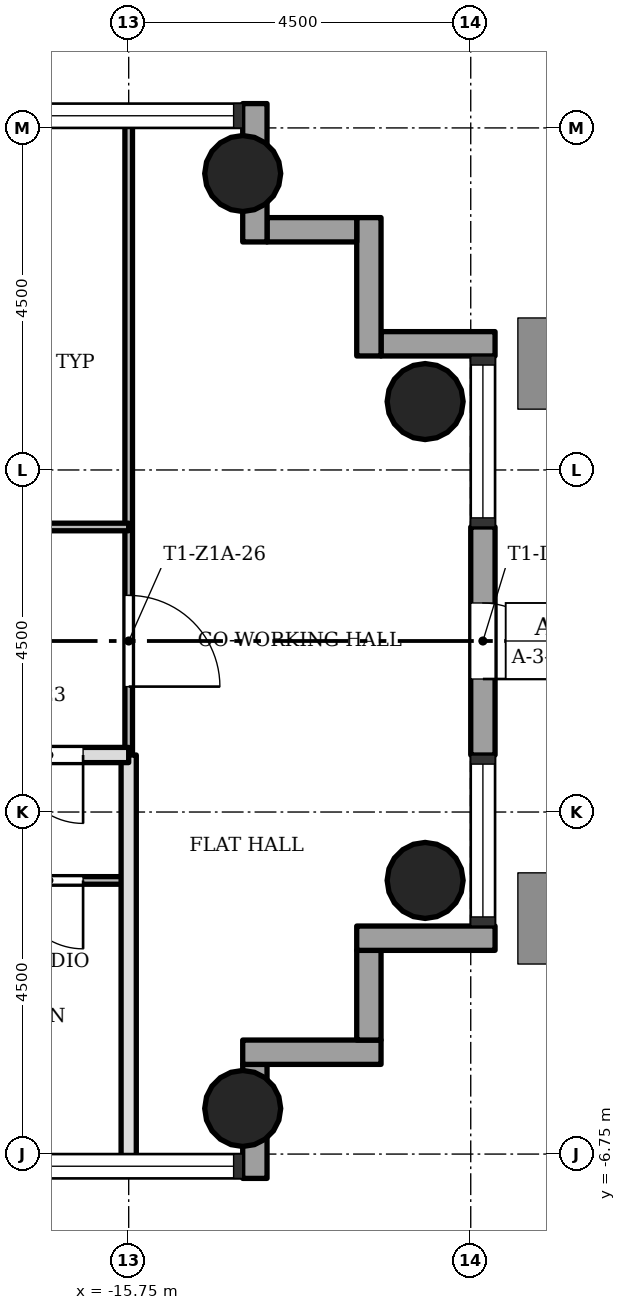
"""IFC4 building model, lengths in metres.
Left out: names, types, materials, properties, quantities, classifications, styles, units other than length and angle.
Written with IfcOpenShell. Run it as: python <this file> out.ifc"""

import sys

from ifc_helpers import new_model, si_unit, direction, frame, frame_2d, origin, origin_2d, place, context, subcontext, project, spatial, rectangle, hollow_circle, extrude, element, fill, save


model = new_model("IFC4")
c1 = context("Model", 3, precision=1e-05, world=origin(), true_north=direction((0.0, 1.0)))
c2 = subcontext(c1, "Body", "Model", "MODEL_VIEW")
j1 = project(units=[si_unit("LENGTHUNIT", "METRE"), si_unit("PLANEANGLEUNIT", "RADIAN")], contexts=[c1])
p1 = place(None, origin())
s1 = spatial("IfcSite", under=j1, at=p1, CompositionType="ELEMENT")
p2 = place(p1, origin())
s2 = spatial("IfcBuilding", under=s1, at=p2, CompositionType="ELEMENT")
p3 = place(p2, frame((0.0, 0.0, 24.5)))
s3 = spatial("IfcBuildingStorey", under=s2, at=p3, CompositionType="ELEMENT", Elevation=24.5)
for number, where, z_axis, x_axis in (
    (1, (-14.25, -6.15, 0.0), (0.0, 0.0, 1.0), (1.0, 0.0, 0.0)),
    (2, (-14.25, 6.15, 0.0), (0.0, 0.0, 1.0), (1.0, 0.0, 0.0)),
    (3, (-11.85, -3.15, 0.0), (0.0, 0.0, 1.0), (1.0, 0.0, 0.0)),
    (4, (-11.85, 3.15, 0.0), (0.0, 0.0, 1.0), (1.0, 0.0, 0.0)),
):
    element("IfcColumn", number, at=place(p3, frame(where, z_axis=z_axis, x_axis=x_axis)), inside=s3, PredefinedType="COLUMN", context=c2, shape_type="SweptSolid", body=[
        extrude(hollow_circle(Radius=0.5, WallThickness=0.036, at=origin_2d()), origin(), (0.0, 0.0, 1.0), 3.4),
    ])
p4 = place(p3, frame((-14.09, -7.07, 0.0), z_axis=(0.0, 0.0, 1.0), x_axis=(0.0, 1.0, 0.0)))
e5 = element("IfcWall", 5, at=p4, inside=s3, PredefinedType="STANDARD", context=c2, shape_type="SweptSolid", body=[
    extrude(rectangle(XDim=1.5, YDim=0.32, at=frame_2d((0.75, 0.0))), origin(), (0.0, 0.0, 1.0), 3.1),
])
p5 = place(p3, frame((-14.25, -5.41, 0.0), z_axis=(0.0, 0.0, 1.0), x_axis=(1.0, 0.0, 0.0)))
e6 = element("IfcWall", 6, at=p5, inside=s3, PredefinedType="STANDARD", context=c2, shape_type="SweptSolid", body=[
    extrude(rectangle(XDim=1.82, YDim=0.32, at=frame_2d((0.91, 0.0))), origin(), (0.0, 0.0, 1.0), 3.1),
])
p6 = place(p3, frame((-12.59, -5.25, 0.0), z_axis=(0.0, 0.0, 1.0), x_axis=(0.0, 1.0, 0.0)))
e7 = element("IfcWall", 7, at=p6, inside=s3, PredefinedType="STANDARD", context=c2, shape_type="SweptSolid", body=[
    extrude(rectangle(XDim=1.18, YDim=0.32, at=frame_2d((0.59, 0.0))), origin(), (0.0, 0.0, 1.0), 3.1),
])
p7 = place(p3, frame((-12.75, -3.91, 0.0), z_axis=(0.0, 0.0, 1.0), x_axis=(1.0, 0.0, 0.0)))
e8 = element("IfcWall", 8, at=p7, inside=s3, PredefinedType="STANDARD", context=c2, shape_type="SweptSolid", body=[
    extrude(rectangle(XDim=1.82, YDim=0.32, at=frame_2d((0.91, 0.0))), origin(), (0.0, 0.0, 1.0), 3.1),
])
p8 = place(p3, frame((-11.09, -1.5, 0.0), z_axis=(0.0, 0.0, 1.0), x_axis=(0.0, 1.0, 0.0)))
e9 = element("IfcWall", 9, at=p8, inside=s3, PredefinedType="STANDARD", context=c2, shape_type="SweptSolid", body=[
    extrude(rectangle(XDim=3.0, YDim=0.32, at=frame_2d((1.5, 0.0))), origin(), (0.0, 0.0, 1.0), 3.1),
])
p9 = place(p8, frame((1.0, 0.0, 0.0)))
e10 = element("IfcOpeningElement", 10, at=p9, cuts=e9, PredefinedType="OPENING", context=c2, shape_type="SweptSolid", body=[
    extrude(rectangle(XDim=1.0, YDim=2.1, at=frame_2d((0.5, 1.05))), frame((0.0, 0.17, 0.0), z_axis=(0.0, -1.0, 0.0), x_axis=(1.0, 0.0, 0.0)), (0.0, 0.0, 1.0), 0.34),
])
p10 = place(p3, frame((-10.93, 3.91, 0.0), z_axis=(0.0, 0.0, 1.0), x_axis=(-1.0, 0.0, 0.0)))
e11 = element("IfcWall", 11, at=p10, inside=s3, PredefinedType="STANDARD", context=c2, shape_type="SweptSolid", body=[
    extrude(rectangle(XDim=1.5, YDim=0.32, at=frame_2d((0.75, 0.0))), origin(), (0.0, 0.0, 1.0), 3.1),
])
p11 = place(p3, frame((-12.59, 3.75, 0.0), z_axis=(0.0, 0.0, 1.0), x_axis=(0.0, 1.0, 0.0)))
e12 = element("IfcWall", 12, at=p11, inside=s3, PredefinedType="STANDARD", context=c2, shape_type="SweptSolid", body=[
    extrude(rectangle(XDim=1.82, YDim=0.32, at=frame_2d((0.91, 0.0))), origin(), (0.0, 0.0, 1.0), 3.1),
])
p12 = place(p3, frame((-12.75, 5.41, 0.0), z_axis=(0.0, 0.0, 1.0), x_axis=(-1.0, 0.0, 0.0)))
e13 = element("IfcWall", 13, at=p12, inside=s3, PredefinedType="STANDARD", context=c2, shape_type="SweptSolid", body=[
    extrude(rectangle(XDim=1.18, YDim=0.32, at=frame_2d((0.59, 0.0))), origin(), (0.0, 0.0, 1.0), 3.1),
])
p13 = place(p3, frame((-14.09, 5.25, 0.0), z_axis=(0.0, 0.0, 1.0), x_axis=(0.0, 1.0, 0.0)))
e14 = element("IfcWall", 14, at=p13, inside=s3, PredefinedType="STANDARD", context=c2, shape_type="SweptSolid", body=[
    extrude(rectangle(XDim=1.82, YDim=0.32, at=frame_2d((0.91, 0.0))), origin(), (0.0, 0.0, 1.0), 3.1),
])
p14 = place(p3, frame((-15.75, -1.5, 0.0), z_axis=(0.0, 0.0, 1.0), x_axis=(0.0, 1.0, 0.0)))
e15 = element("IfcWall", 15, at=p14, inside=s3, PredefinedType="PARTITIONING", context=c2, shape_type="SweptSolid", body=[
    extrude(rectangle(XDim=8.35, YDim=0.1, at=frame_2d((4.175, 0.0))), origin(), (0.0, 0.0, 1.0), 3.0),
])
p15 = place(p14, frame((0.9, 0.0, 0.0)))
e16 = element("IfcOpeningElement", 16, at=p15, cuts=e15, PredefinedType="OPENING", context=c2, shape_type="SweptSolid", body=[
    extrude(rectangle(XDim=1.2, YDim=2.1, at=frame_2d((0.6, 1.05))), frame((0.0, 0.06, 0.0), z_axis=(0.0, -1.0, 0.0), x_axis=(1.0, 0.0, 0.0)), (0.0, 0.0, 1.0), 0.12),
])
p16 = place(p3, frame((-15.75, -6.85, 0.0), z_axis=(0.0, 0.0, 1.0), x_axis=(0.0, 1.0, 0.0)))
e17 = element("IfcWall", 17, at=p16, inside=s3, PredefinedType="SOLIDWALL", context=c2, shape_type="SweptSolid", body=[
    extrude(rectangle(XDim=5.35, YDim=0.2, at=frame_2d((2.675, 0.0))), origin(), (0.0, 0.0, 1.0), 3.0),
])
p17 = place(p3, frame((-20.25, -3.15, 0.0), z_axis=(0.0, 0.0, 1.0), x_axis=(1.0, 0.0, 0.0)))
e18 = element("IfcWall", 18, at=p17, inside=s3, PredefinedType="PARTITIONING", context=c2, shape_type="SweptSolid", body=[
    extrude(rectangle(XDim=4.5, YDim=0.1, at=frame_2d((2.25, 0.0))), origin(), (0.0, 0.0, 1.0), 3.0),
])
p18 = place(p17, frame((3.0, 0.0, 0.0)))
e19 = element("IfcOpeningElement", 19, at=p18, cuts=e18, PredefinedType="OPENING", context=c2, shape_type="SweptSolid", body=[
    extrude(rectangle(XDim=0.9, YDim=2.1, at=frame_2d((0.45, 1.05))), frame((0.0, 0.06, 0.0), z_axis=(0.0, -1.0, 0.0), x_axis=(1.0, 0.0, 0.0)), (0.0, 0.0, 1.0), 0.12),
])
p19 = place(p3, frame((-20.25, -1.5, 0.0), z_axis=(0.0, 0.0, 1.0), x_axis=(1.0, 0.0, 0.0)))
e20 = element("IfcWall", 20, at=p19, inside=s3, PredefinedType="SOLIDWALL", context=c2, shape_type="SweptSolid", body=[
    extrude(rectangle(XDim=4.5, YDim=0.2, at=frame_2d((2.25, 0.0))), origin(), (0.0, 0.0, 1.0), 3.0),
])
p20 = place(p19, frame((3.0, 0.0, 0.0)))
e21 = element("IfcOpeningElement", 21, at=p20, cuts=e20, PredefinedType="OPENING", context=c2, shape_type="SweptSolid", body=[
    extrude(rectangle(XDim=0.9, YDim=2.1, at=frame_2d((0.45, 1.05))), frame((0.0, 0.11, 0.0), z_axis=(0.0, -1.0, 0.0), x_axis=(1.0, 0.0, 0.0)), (0.0, 0.0, 1.0), 0.22),
])
p21 = place(p3, frame((-20.25, 1.5, 0.0), z_axis=(0.0, 0.0, 1.0), x_axis=(1.0, 0.0, 0.0)))
e22 = element("IfcWall", 22, at=p21, inside=s3, PredefinedType="PARTITIONING", context=c2, shape_type="SweptSolid", body=[
    extrude(rectangle(XDim=4.5, YDim=0.1, at=frame_2d((2.25, 0.0))), origin(), (0.0, 0.0, 1.0), 3.0),
])
p22 = place(p21, frame((1.8, 0.0, 0.0)))
e23 = element("IfcOpeningElement", 23, at=p22, cuts=e22, PredefinedType="OPENING", context=c2, shape_type="SweptSolid", body=[
    extrude(rectangle(XDim=0.9, YDim=2.1, at=frame_2d((0.45, 1.05))), frame((0.0, 0.06, 0.0), z_axis=(0.0, -1.0, 0.0), x_axis=(1.0, 0.0, 0.0)), (0.0, 0.0, 1.0), 0.12),
])
p23 = place(p9, origin())
e24 = element("IfcDoor", 24, at=p23, inside=s3, OperationType="SINGLE_SWING_LEFT", PredefinedType="DOOR", context=c2, shape_type="SweptSolid", body=[
    extrude(rectangle(XDim=1.0, YDim=2.1, at=frame_2d((0.5, 1.05))), frame((0.0, 0.025, 0.0), z_axis=(0.0, -1.0, 0.0), x_axis=(1.0, 0.0, 0.0)), (0.0, 0.0, 1.0), 0.05),
])
fill(e10, e24)
p24 = place(p20, origin())
e25 = element("IfcDoor", 25, at=p24, inside=s3, OperationType="SINGLE_SWING_RIGHT", PredefinedType="DOOR", context=c2, shape_type="SweptSolid", body=[
    extrude(rectangle(XDim=0.9, YDim=2.1, at=frame_2d((0.45, 1.05))), frame((0.0, 0.025, 0.0), z_axis=(0.0, -1.0, 0.0), x_axis=(1.0, 0.0, 0.0)), (0.0, 0.0, 1.0), 0.05),
])
fill(e21, e25)
p25 = place(p18, origin())
e26 = element("IfcDoor", 26, at=p25, inside=s3, OperationType="SINGLE_SWING_RIGHT", PredefinedType="DOOR", context=c2, shape_type="SweptSolid", body=[
    extrude(rectangle(XDim=0.9, YDim=2.1, at=frame_2d((0.45, 1.05))), frame((0.0, 0.025, 0.0), z_axis=(0.0, -1.0, 0.0), x_axis=(1.0, 0.0, 0.0)), (0.0, 0.0, 1.0), 0.05),
])
fill(e19, e26)
p26 = place(p15, origin())
e27 = element("IfcDoor", 27, at=p26, inside=s3, OperationType="SINGLE_SWING_LEFT", PredefinedType="DOOR", context=c2, shape_type="SweptSolid", body=[
    extrude(rectangle(XDim=1.2, YDim=2.1, at=frame_2d((0.6, 1.05))), frame((0.0, 0.025, 0.0), z_axis=(0.0, -1.0, 0.0), x_axis=(1.0, 0.0, 0.0)), (0.0, 0.0, 1.0), 0.05),
])
fill(e16, e27)
save(model, sys.argv[1])
